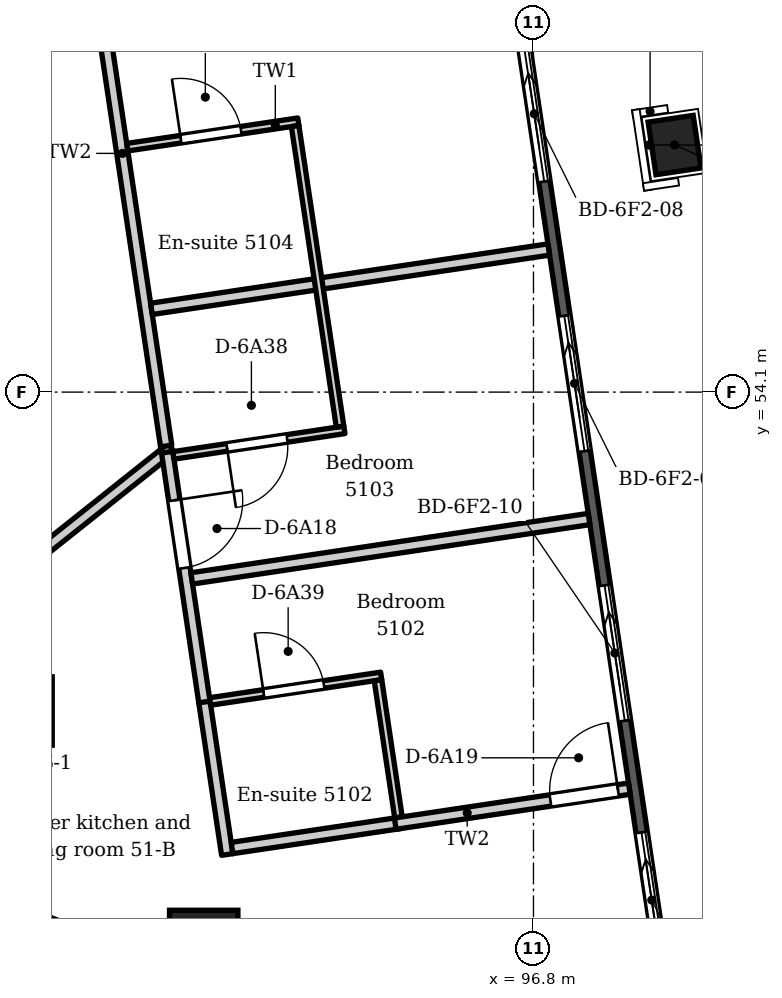
"""IFC4 building model, lengths in metres.
Left out: names, types, materials, properties, quantities, classifications, styles, units other than length and angle.
Written with IfcOpenShell. Run it as: python <this file> out.ifc"""

import sys

from ifc_helpers import new_model, si_unit, direction, frame, frame_2d, origin, origin_2d, place, context, subcontext, project, spatial, polyline, rectangle, circle, outline, extrude, element, fill, save


model = new_model("IFC4")
c1 = context("Model", 3, precision=1e-05, world=origin(), true_north=direction((0.0, 1.0)))
c2 = subcontext(c1, "Body", "Model", "MODEL_VIEW")
j1 = project(units=[si_unit("LENGTHUNIT", "METRE"), si_unit("PLANEANGLEUNIT", "RADIAN")], contexts=[c1])
p1 = place(None, origin())
s1 = spatial("IfcSite", under=j1, at=p1, CompositionType="ELEMENT")
p2 = place(p1, origin())
s2 = spatial("IfcBuilding", under=s1, at=p2, CompositionType="ELEMENT")
p3 = place(p2, frame((0.0, 0.0, 198.0)))
s3 = spatial("IfcBuildingStorey", under=s2, at=p3, CompositionType="ELEMENT", Elevation=198.0)
p4 = place(p3, frame((98.656, 57.35, -0.35), z_axis=(0.0, 0.0, 1.0), x_axis=(-0.14780941113, 0.989015863362, 0.0)))
e1 = element("IfcColumn", 1, at=p4, inside=s3, PredefinedType="COLUMN", context=c2, shape_type="SweptSolid", body=[
    extrude(rectangle(XDim=0.7, YDim=0.6, at=origin_2d()), origin(), (0.0, 0.0, 1.0), 3.95),
])
for number, where, z_axis, x_axis in (
    (2, (90.019, 49.905, -0.35), (0.0, 0.0, 1.0), (1.0, 0.0, 0.0)),
    (3, (92.462, 46.833, -0.35), (0.0, 0.0, 1.0), (1.0, 0.0, 0.0)),
):
    element("IfcColumn", number, at=place(p3, frame(where, z_axis=z_axis, x_axis=x_axis)), inside=s3, PredefinedType="COLUMN", context=c2, shape_type="SweptSolid", body=[
        extrude(circle(Radius=0.45, at=origin_2d()), origin(), (0.0, 0.0, 1.0), 3.95),
    ])
p5 = place(p3, frame((92.835, 84.36, 0.0), z_axis=(0.0, 0.0, 1.0), x_axis=(0.147810490781, -0.989015702006, 0.0)))
e4 = element("IfcWall", 4, at=p5, inside=s3, PredefinedType="SOLIDWALL", context=c2, shape_type="SweptSolid", body=[
    extrude(outline(polyline([(0.149, 0.075), (0.149, -0.075), (39.297, -0.075), (39.297, 0.075), (0.149, 0.075)])), origin(), (0.0, 0.0, 1.0), 3.3),
])
p6 = place(p5, frame((1.193, 0.0, 0.0)))
e5 = element("IfcOpeningElement", 5, at=p6, cuts=e4, PredefinedType="OPENING", context=c2, shape_type="SweptSolid", body=[
    extrude(rectangle(XDim=1.8, YDim=2.6, at=frame_2d((0.9, 1.3))), frame((0.0, 0.085, 0.0), z_axis=(0.0, -1.0, 0.0), x_axis=(1.0, 0.0, 0.0)), (0.0, 0.0, 1.0), 0.17),
])
p7 = place(p5, frame((4.479, 0.0, 0.0)))
e6 = element("IfcOpeningElement", 6, at=p7, cuts=e4, PredefinedType="OPENING", context=c2, shape_type="SweptSolid", body=[
    extrude(rectangle(XDim=1.8, YDim=2.6, at=frame_2d((0.9, 1.3))), frame((0.0, 0.085, 0.0), z_axis=(0.0, -1.0, 0.0), x_axis=(1.0, 0.0, 0.0)), (0.0, 0.0, 1.0), 0.17),
])
p8 = place(p5, frame((8.065, 0.0, 0.0)))
e7 = element("IfcOpeningElement", 7, at=p8, cuts=e4, PredefinedType="OPENING", context=c2, shape_type="SweptSolid", body=[
    extrude(rectangle(XDim=1.8, YDim=2.6, at=frame_2d((0.9, 1.3))), frame((0.0, 0.085, 0.0), z_axis=(0.0, -1.0, 0.0), x_axis=(1.0, 0.0, 0.0)), (0.0, 0.0, 1.0), 0.17),
])
p9 = place(p5, frame((11.651, 0.0, 0.0)))
e8 = element("IfcOpeningElement", 8, at=p9, cuts=e4, PredefinedType="OPENING", context=c2, shape_type="SweptSolid", body=[
    extrude(rectangle(XDim=1.8, YDim=2.6, at=frame_2d((0.9, 1.3))), frame((0.0, 0.085, 0.0), z_axis=(0.0, -1.0, 0.0), x_axis=(1.0, 0.0, 0.0)), (0.0, 0.0, 1.0), 0.17),
])
p10 = place(p5, frame((15.237, 0.0, 0.0)))
e9 = element("IfcOpeningElement", 9, at=p10, cuts=e4, PredefinedType="OPENING", context=c2, shape_type="SweptSolid", body=[
    extrude(rectangle(XDim=1.8, YDim=2.6, at=frame_2d((0.9, 1.3))), frame((0.0, 0.085, 0.0), z_axis=(0.0, -1.0, 0.0), x_axis=(1.0, 0.0, 0.0)), (0.0, 0.0, 1.0), 0.17),
])
p11 = place(p5, frame((18.823, 0.0, 0.0)))
e10 = element("IfcOpeningElement", 10, at=p11, cuts=e4, PredefinedType="OPENING", context=c2, shape_type="SweptSolid", body=[
    extrude(rectangle(XDim=1.8, YDim=2.6, at=frame_2d((0.9, 1.3))), frame((0.0, 0.085, 0.0), z_axis=(0.0, -1.0, 0.0), x_axis=(1.0, 0.0, 0.0)), (0.0, 0.0, 1.0), 0.17),
])
p12 = place(p5, frame((22.409, 0.0, 0.0)))
e11 = element("IfcOpeningElement", 11, at=p12, cuts=e4, PredefinedType="OPENING", context=c2, shape_type="SweptSolid", body=[
    extrude(rectangle(XDim=1.8, YDim=2.6, at=frame_2d((0.9, 1.3))), frame((0.0, 0.085, 0.0), z_axis=(0.0, -1.0, 0.0), x_axis=(1.0, 0.0, 0.0)), (0.0, 0.0, 1.0), 0.17),
])
p13 = place(p5, frame((25.995, 0.0, 0.0)))
e12 = element("IfcOpeningElement", 12, at=p13, cuts=e4, PredefinedType="OPENING", context=c2, shape_type="SweptSolid", body=[
    extrude(rectangle(XDim=1.8, YDim=2.6, at=frame_2d((0.9, 1.3))), frame((0.0, 0.085, 0.0), z_axis=(0.0, -1.0, 0.0), x_axis=(1.0, 0.0, 0.0)), (0.0, 0.0, 1.0), 0.17),
])
p14 = place(p5, frame((29.581, 0.0, 0.0)))
e13 = element("IfcOpeningElement", 13, at=p14, cuts=e4, PredefinedType="OPENING", context=c2, shape_type="SweptSolid", body=[
    extrude(rectangle(XDim=1.8, YDim=2.6, at=frame_2d((0.9, 1.3))), frame((0.0, 0.085, 0.0), z_axis=(0.0, -1.0, 0.0), x_axis=(1.0, 0.0, 0.0)), (0.0, 0.0, 1.0), 0.17),
])
p15 = place(p5, frame((33.167, 0.0, 0.0)))
e14 = element("IfcOpeningElement", 14, at=p15, cuts=e4, PredefinedType="OPENING", context=c2, shape_type="SweptSolid", body=[
    extrude(rectangle(XDim=1.8, YDim=2.6, at=frame_2d((0.9, 1.3))), frame((0.0, 0.085, 0.0), z_axis=(0.0, -1.0, 0.0), x_axis=(1.0, 0.0, 0.0)), (0.0, 0.0, 1.0), 0.17),
])
p16 = place(p5, frame((36.453, 0.0, 0.0)))
e15 = element("IfcOpeningElement", 15, at=p16, cuts=e4, PredefinedType="OPENING", context=c2, shape_type="SweptSolid", body=[
    extrude(rectangle(XDim=1.8, YDim=2.6, at=frame_2d((0.9, 1.3))), frame((0.0, 0.085, 0.0), z_axis=(0.0, -1.0, 0.0), x_axis=(1.0, 0.0, 0.0)), (0.0, 0.0, 1.0), 0.17),
])
p17 = place(p3, frame((92.514, 40.454, 0.0), z_axis=(0.0, 0.0, 1.0), x_axis=(-0.930417922313, 0.3665003272, 0.0)))
e16 = element("IfcWall", 16, at=p17, inside=s3, PredefinedType="SOLIDWALL", context=c2, shape_type="SweptSolid", body=[
    extrude(outline(polyline([(0.149, 0.075), (0.149, -0.075), (39.297, -0.075), (39.297, 0.075), (0.149, 0.075)])), origin(), (0.0, 0.0, 1.0), 3.3),
])
p18 = place(p17, frame((1.193, 0.0, 0.0)))
e17 = element("IfcOpeningElement", 17, at=p18, cuts=e16, PredefinedType="OPENING", context=c2, shape_type="SweptSolid", body=[
    extrude(rectangle(XDim=1.8, YDim=2.6, at=frame_2d((0.9, 1.3))), frame((0.0, 0.085, 0.0), z_axis=(0.0, -1.0, 0.0), x_axis=(1.0, 0.0, 0.0)), (0.0, 0.0, 1.0), 0.17),
])
p19 = place(p17, frame((4.479, 0.0, 0.0)))
e18 = element("IfcOpeningElement", 18, at=p19, cuts=e16, PredefinedType="OPENING", context=c2, shape_type="SweptSolid", body=[
    extrude(rectangle(XDim=1.8, YDim=2.6, at=frame_2d((0.9, 1.3))), frame((0.0, 0.085, 0.0), z_axis=(0.0, -1.0, 0.0), x_axis=(1.0, 0.0, 0.0)), (0.0, 0.0, 1.0), 0.17),
])
p20 = place(p17, frame((8.065, 0.0, 0.0)))
e19 = element("IfcOpeningElement", 19, at=p20, cuts=e16, PredefinedType="OPENING", context=c2, shape_type="SweptSolid", body=[
    extrude(rectangle(XDim=1.8, YDim=2.6, at=frame_2d((0.9, 1.3))), frame((0.0, 0.085, 0.0), z_axis=(0.0, -1.0, 0.0), x_axis=(1.0, 0.0, 0.0)), (0.0, 0.0, 1.0), 0.17),
])
p21 = place(p17, frame((11.651, 0.0, 0.0)))
e20 = element("IfcOpeningElement", 20, at=p21, cuts=e16, PredefinedType="OPENING", context=c2, shape_type="SweptSolid", body=[
    extrude(rectangle(XDim=1.8, YDim=2.6, at=frame_2d((0.9, 1.3))), frame((0.0, 0.085, 0.0), z_axis=(0.0, -1.0, 0.0), x_axis=(1.0, 0.0, 0.0)), (0.0, 0.0, 1.0), 0.17),
])
p22 = place(p17, frame((15.237, 0.0, 0.0)))
e21 = element("IfcOpeningElement", 21, at=p22, cuts=e16, PredefinedType="OPENING", context=c2, shape_type="SweptSolid", body=[
    extrude(rectangle(XDim=1.8, YDim=2.6, at=frame_2d((0.9, 1.3))), frame((0.0, 0.085, 0.0), z_axis=(0.0, -1.0, 0.0), x_axis=(1.0, 0.0, 0.0)), (0.0, 0.0, 1.0), 0.17),
])
p23 = place(p17, frame((18.823, 0.0, 0.0)))
e22 = element("IfcOpeningElement", 22, at=p23, cuts=e16, PredefinedType="OPENING", context=c2, shape_type="SweptSolid", body=[
    extrude(rectangle(XDim=1.8, YDim=2.6, at=frame_2d((0.9, 1.3))), frame((0.0, 0.085, 0.0), z_axis=(0.0, -1.0, 0.0), x_axis=(1.0, 0.0, 0.0)), (0.0, 0.0, 1.0), 0.17),
])
p24 = place(p17, frame((22.409, 0.0, 0.0)))
e23 = element("IfcOpeningElement", 23, at=p24, cuts=e16, PredefinedType="OPENING", context=c2, shape_type="SweptSolid", body=[
    extrude(rectangle(XDim=1.8, YDim=2.6, at=frame_2d((0.9, 1.3))), frame((0.0, 0.085, 0.0), z_axis=(0.0, -1.0, 0.0), x_axis=(1.0, 0.0, 0.0)), (0.0, 0.0, 1.0), 0.17),
])
p25 = place(p17, frame((25.995, 0.0, 0.0)))
e24 = element("IfcOpeningElement", 24, at=p25, cuts=e16, PredefinedType="OPENING", context=c2, shape_type="SweptSolid", body=[
    extrude(rectangle(XDim=1.8, YDim=2.6, at=frame_2d((0.9, 1.3))), frame((0.0, 0.085, 0.0), z_axis=(0.0, -1.0, 0.0), x_axis=(1.0, 0.0, 0.0)), (0.0, 0.0, 1.0), 0.17),
])
p26 = place(p17, frame((29.581, 0.0, 0.0)))
e25 = element("IfcOpeningElement", 25, at=p26, cuts=e16, PredefinedType="OPENING", context=c2, shape_type="SweptSolid", body=[
    extrude(rectangle(XDim=1.8, YDim=2.6, at=frame_2d((0.9, 1.3))), frame((0.0, 0.085, 0.0), z_axis=(0.0, -1.0, 0.0), x_axis=(1.0, 0.0, 0.0)), (0.0, 0.0, 1.0), 0.17),
])
p27 = place(p17, frame((33.167, 0.0, 0.0)))
e26 = element("IfcOpeningElement", 26, at=p27, cuts=e16, PredefinedType="OPENING", context=c2, shape_type="SweptSolid", body=[
    extrude(rectangle(XDim=1.8, YDim=2.6, at=frame_2d((0.9, 1.3))), frame((0.0, 0.085, 0.0), z_axis=(0.0, -1.0, 0.0), x_axis=(1.0, 0.0, 0.0)), (0.0, 0.0, 1.0), 0.17),
])
p28 = place(p17, frame((36.453, 0.0, 0.0)))
e27 = element("IfcOpeningElement", 27, at=p28, cuts=e16, PredefinedType="OPENING", context=c2, shape_type="SweptSolid", body=[
    extrude(rectangle(XDim=1.8, YDim=2.6, at=frame_2d((0.9, 1.3))), frame((0.0, 0.085, 0.0), z_axis=(0.0, -1.0, 0.0), x_axis=(1.0, 0.0, 0.0)), (0.0, 0.0, 1.0), 0.17),
])
p29 = place(p3, origin())
e28 = element("IfcWall", 28, at=p29, inside=s3, PredefinedType="PARAPET", context=c2, shape_type="SweptSolid", body=[
    extrude(outline(polyline([(64.54, 48.931), (93.272, 32.007), (93.275, 32.354), (66.324, 48.229), (64.54, 48.931)])), origin(), (0.0, 0.0, 1.0), 1.1),
])
p30 = place(p3, frame((87.833, 48.14, 0.0), z_axis=(0.0, 0.0, 1.0), x_axis=(0.930350489768, -0.366671469014, 0.0)))
e29 = element("IfcWall", 29, at=p30, inside=s3, PredefinedType="PARTITIONING", context=c2, shape_type="SweptSolid", body=[
    extrude(rectangle(XDim=3.661, YDim=0.15, at=frame_2d((1.83, 0.0))), origin(), (0.0, 0.0, 1.0), 3.3),
])
p31 = place(p3, frame((90.285, 51.969, 0.0), z_axis=(0.0, 0.0, 1.0), x_axis=(0.782471905859, 0.622685889145, 0.0)))
e30 = element("IfcWall", 30, at=p31, inside=s3, PredefinedType="PARTITIONING", context=c2, shape_type="SweptSolid", body=[
    extrude(rectangle(XDim=2.24, YDim=0.15, at=frame_2d((1.12, 0.0))), origin(), (0.0, 0.0, 1.0), 3.3),
])
p32 = place(p3, frame((90.628, 62.355, 0.0), z_axis=(0.0, 0.0, 1.0), x_axis=(0.147851766837, -0.989009532332, 0.0)))
e31 = element("IfcWall", 31, at=p32, inside=s3, PredefinedType="PARTITIONING", context=c2, shape_type="SweptSolid", body=[
    extrude(rectangle(XDim=9.064, YDim=0.15, at=frame_2d((4.532, 0.0))), origin(), (0.0, 0.0, 1.0), 3.3),
])
p33 = place(p32, frame((0.229, 0.0, 0.0)))
e32 = element("IfcOpeningElement", 32, at=p33, cuts=e31, PredefinedType="OPENING", context=c2, shape_type="SweptSolid", body=[
    extrude(rectangle(XDim=0.9, YDim=2.1, at=frame_2d((0.45, 1.05))), frame((0.0, 0.085, 0.0), z_axis=(0.0, -1.0, 0.0), x_axis=(1.0, 0.0, 0.0)), (0.0, 0.0, 1.0), 0.17),
])
p34 = place(p3, frame((91.456, 57.322, 0.0), z_axis=(0.0, 0.0, 1.0), x_axis=(0.989070541656, 0.147443086062, 0.0)))
e33 = element("IfcWall", 33, at=p34, inside=s3, PredefinedType="PARTITIONING", context=c2, shape_type="SweptSolid", body=[
    extrude(rectangle(XDim=2.275, YDim=0.1, at=frame_2d((1.138, 0.0))), origin(), (0.0, 0.0, 1.0), 3.3),
])
p35 = place(p34, frame((0.713, 0.0, 0.0)))
e34 = element("IfcOpeningElement", 34, at=p35, cuts=e33, PredefinedType="OPENING", context=c2, shape_type="SweptSolid", body=[
    extrude(rectangle(XDim=0.8, YDim=2.1, at=frame_2d((0.4, 1.05))), frame((0.0, 0.06, 0.0), z_axis=(0.0, -1.0, 0.0), x_axis=(1.0, 0.0, 0.0)), (0.0, 0.0, 1.0), 0.12),
])
p36 = place(p3, frame((91.774, 55.195, 0.0), z_axis=(0.0, 0.0, 1.0), x_axis=(0.98902190879, 0.147768954566, 0.0)))
e35 = element("IfcWall", 35, at=p36, inside=s3, PredefinedType="PARTITIONING", context=c2, shape_type="SweptSolid", body=[
    extrude(rectangle(XDim=5.285, YDim=0.15, at=frame_2d((2.643, 0.0))), origin(), (0.0, 0.0, 1.0), 3.3),
])
p37 = place(p3, frame((91.981, 53.31, 0.0), z_axis=(0.0, 0.0, 1.0), x_axis=(0.147462331027, -0.989067672572, 0.0)))
e36 = element("IfcWall", 36, at=p37, inside=s3, PredefinedType="PARTITIONING", context=c2, shape_type="SweptSolid", body=[
    extrude(rectangle(XDim=3.331, YDim=0.15, at=frame_2d((1.666, 0.0))), origin(), (0.0, 0.0, 1.0), 3.3),
])
p38 = place(p37, frame((0.64, 0.0, 0.0)))
e37 = element("IfcOpeningElement", 37, at=p38, cuts=e36, PredefinedType="OPENING", context=c2, shape_type="SweptSolid", body=[
    extrude(rectangle(XDim=0.9, YDim=2.1, at=frame_2d((0.45, 1.05))), frame((0.0, 0.085, 0.0), z_axis=(0.0, -1.0, 0.0), x_axis=(1.0, 0.0, 0.0)), (0.0, 0.0, 1.0), 0.17),
])
p39 = place(p3, frame((92.063, 53.267, 0.0), z_axis=(0.0, 0.0, 1.0), x_axis=(0.988998470103, 0.147925745338, 0.0)))
e38 = element("IfcWall", 38, at=p39, inside=s3, PredefinedType="PARTITIONING", context=c2, shape_type="SweptSolid", body=[
    extrude(rectangle(XDim=2.274, YDim=0.1, at=frame_2d((1.137, 0.0))), origin(), (0.0, 0.0, 1.0), 3.3),
])
p40 = place(p39, frame((0.712, 0.0, 0.0)))
e39 = element("IfcOpeningElement", 39, at=p40, cuts=e38, PredefinedType="OPENING", context=c2, shape_type="SweptSolid", body=[
    extrude(rectangle(XDim=0.8, YDim=2.1, at=frame_2d((0.4, 1.05))), frame((0.0, 0.06, 0.0), z_axis=(0.0, -1.0, 0.0), x_axis=(1.0, 0.0, 0.0)), (0.0, 0.0, 1.0), 0.12),
])
p41 = place(p3, frame((92.304, 51.649, 0.0), z_axis=(0.0, 0.0, 1.0), x_axis=(0.98902190879, 0.147768954566, 0.0)))
e40 = element("IfcWall", 40, at=p41, inside=s3, PredefinedType="PARTITIONING", context=c2, shape_type="SweptSolid", body=[
    extrude(rectangle(XDim=5.285, YDim=0.15, at=frame_2d((2.643, 0.0))), origin(), (0.0, 0.0, 1.0), 3.3),
])
p42 = place(p3, frame((92.471, 50.023, 0.0), z_axis=(0.0, 0.0, 1.0), x_axis=(0.147922563544, -0.988998946003, 0.0)))
e41 = element("IfcWall", 41, at=p42, inside=s3, PredefinedType="PARTITIONING", context=c2, shape_type="SweptSolid", body=[
    extrude(rectangle(XDim=2.028, YDim=0.15, at=frame_2d((1.014, 0.0))), origin(), (0.0, 0.0, 1.0), 3.3),
])
p43 = place(p3, frame((92.546, 50.03, 0.0), z_axis=(0.0, 0.0, 1.0), x_axis=(0.989007860101, 0.147862952286, 0.0)))
e42 = element("IfcWall", 42, at=p43, inside=s3, PredefinedType="PARTITIONING", context=c2, shape_type="SweptSolid", body=[
    extrude(rectangle(XDim=2.275, YDim=0.1, at=frame_2d((1.138, 0.0))), origin(), (0.0, 0.0, 1.0), 3.3),
])
p44 = place(p43, frame((0.713, 0.0, 0.0)))
e43 = element("IfcOpeningElement", 43, at=p44, cuts=e42, PredefinedType="OPENING", context=c2, shape_type="SweptSolid", body=[
    extrude(rectangle(XDim=0.8, YDim=2.1, at=frame_2d((0.4, 1.05))), frame((0.0, 0.06, 0.0), z_axis=(0.0, -1.0, 0.0), x_axis=(1.0, 0.0, 0.0)), (0.0, 0.0, 1.0), 0.12),
])
p45 = place(p3, frame((92.834, 48.102, 0.0), z_axis=(0.0, 0.0, 1.0), x_axis=(0.989058920162, 0.147521023747, 0.0)))
e44 = element("IfcWall", 44, at=p45, inside=s3, PredefinedType="PARTITIONING", context=c2, shape_type="SweptSolid", body=[
    extrude(rectangle(XDim=2.229, YDim=0.15, at=frame_2d((1.115, 0.0))), origin(), (0.0, 0.0, 1.0), 3.3),
])
p46 = place(p3, frame((93.664, 57.601, 0.0), z_axis=(0.0, 0.0, 1.0), x_axis=(0.147862783837, -0.989007885285, 0.0)))
e45 = element("IfcWall", 45, at=p46, inside=s3, PredefinedType="PARTITIONING", context=c2, shape_type="SweptSolid", body=[
    extrude(rectangle(XDim=3.999, YDim=0.1, at=frame_2d((2.0, 0.0))), origin(), (0.0, 0.0, 1.0), 3.3),
])
p47 = place(p3, frame((94.754, 50.31, 0.0), z_axis=(0.0, 0.0, 1.0), x_axis=(0.14773187693, -0.989027447819, 0.0)))
e46 = element("IfcWall", 46, at=p47, inside=s3, PredefinedType="PARTITIONING", context=c2, shape_type="SweptSolid", body=[
    extrude(rectangle(XDim=1.824, YDim=0.1, at=frame_2d((0.912, 0.0))), origin(), (0.0, 0.0, 1.0), 3.3),
])
p48 = place(p3, frame((94.981, 48.423, 0.0), z_axis=(0.0, 0.0, 1.0), x_axis=(0.989008118829, 0.147861221729, 0.0)))
e47 = element("IfcWall", 47, at=p48, inside=s3, PredefinedType="PARTITIONING", context=c2, shape_type="SweptSolid", body=[
    extrude(rectangle(XDim=3.114, YDim=0.15, at=frame_2d((1.557, 0.0))), origin(), (0.0, 0.0, 1.0), 3.3),
])
p49 = place(p48, frame((2.064, 0.0, 0.0)))
e48 = element("IfcOpeningElement", 48, at=p49, cuts=e47, PredefinedType="OPENING", context=c2, shape_type="SweptSolid", body=[
    extrude(rectangle(XDim=0.9, YDim=2.1, at=frame_2d((0.45, 1.05))), frame((0.0, 0.085, 0.0), z_axis=(0.0, -1.0, 0.0), x_axis=(1.0, 0.0, 0.0)), (0.0, 0.0, 1.0), 0.17),
])
p50 = place(p13, origin())
e49 = element("IfcDoor", 49, at=p50, inside=s3, OperationType="SLIDING_TO_LEFT", PredefinedType="DOOR", context=c2, shape_type="SweptSolid", body=[
    extrude(rectangle(XDim=1.8, YDim=2.6, at=frame_2d((0.9, 1.3))), frame((0.0, 0.025, 0.0), z_axis=(0.0, -1.0, 0.0), x_axis=(1.0, 0.0, 0.0)), (0.0, 0.0, 1.0), 0.05),
])
fill(e12, e49)
p51 = place(p14, origin())
e50 = element("IfcDoor", 50, at=p51, inside=s3, OperationType="SLIDING_TO_LEFT", PredefinedType="DOOR", context=c2, shape_type="SweptSolid", body=[
    extrude(rectangle(XDim=1.8, YDim=2.6, at=frame_2d((0.9, 1.3))), frame((0.0, 0.025, 0.0), z_axis=(0.0, -1.0, 0.0), x_axis=(1.0, 0.0, 0.0)), (0.0, 0.0, 1.0), 0.05),
])
fill(e13, e50)
p52 = place(p15, origin())
e51 = element("IfcDoor", 51, at=p52, inside=s3, OperationType="SLIDING_TO_LEFT", PredefinedType="DOOR", context=c2, shape_type="SweptSolid", body=[
    extrude(rectangle(XDim=1.8, YDim=2.6, at=frame_2d((0.9, 1.3))), frame((0.0, 0.025, 0.0), z_axis=(0.0, -1.0, 0.0), x_axis=(1.0, 0.0, 0.0)), (0.0, 0.0, 1.0), 0.05),
])
fill(e14, e51)
p53 = place(p16, origin())
e52 = element("IfcDoor", 52, at=p53, inside=s3, OperationType="SLIDING_TO_LEFT", PredefinedType="DOOR", context=c2, shape_type="SweptSolid", body=[
    extrude(rectangle(XDim=1.8, YDim=2.6, at=frame_2d((0.9, 1.3))), frame((0.0, 0.025, 0.0), z_axis=(0.0, -1.0, 0.0), x_axis=(1.0, 0.0, 0.0)), (0.0, 0.0, 1.0), 0.05),
])
fill(e15, e52)
p54 = place(p38, origin())
e53 = element("IfcDoor", 53, at=p54, inside=s3, OperationType="SINGLE_SWING_LEFT", PredefinedType="DOOR", context=c2, shape_type="SweptSolid", body=[
    extrude(rectangle(XDim=0.9, YDim=2.1, at=frame_2d((0.45, 1.05))), frame((0.0, 0.025, 0.0), z_axis=(0.0, -1.0, 0.0), x_axis=(1.0, 0.0, 0.0)), (0.0, 0.0, 1.0), 0.05),
])
fill(e37, e53)
p55 = place(p49, origin())
e54 = element("IfcDoor", 54, at=p55, inside=s3, OperationType="SINGLE_SWING_RIGHT", PredefinedType="DOOR", context=c2, shape_type="SweptSolid", body=[
    extrude(rectangle(XDim=0.9, YDim=2.1, at=frame_2d((0.45, 1.05))), frame((0.0, 0.025, 0.0), z_axis=(0.0, -1.0, 0.0), x_axis=(1.0, 0.0, 0.0)), (0.0, 0.0, 1.0), 0.05),
])
fill(e48, e54)
p56 = place(p35, origin())
e55 = element("IfcDoor", 55, at=p56, inside=s3, OperationType="SINGLE_SWING_LEFT", PredefinedType="DOOR", context=c2, shape_type="SweptSolid", body=[
    extrude(rectangle(XDim=0.8, YDim=2.1, at=frame_2d((0.4, 1.05))), frame((0.0, 0.025, 0.0), z_axis=(0.0, -1.0, 0.0), x_axis=(1.0, 0.0, 0.0)), (0.0, 0.0, 1.0), 0.05),
])
fill(e34, e55)
p57 = place(p40, frame((0.8, 0.0, 0.0), z_axis=(0.0, 0.0, 1.0), x_axis=(-1.0, 0.0, 0.0)))
e56 = element("IfcDoor", 56, at=p57, inside=s3, OperationType="SINGLE_SWING_RIGHT", PredefinedType="DOOR", context=c2, shape_type="SweptSolid", body=[
    extrude(rectangle(XDim=0.8, YDim=2.1, at=frame_2d((0.4, 1.05))), frame((0.0, 0.025, 0.0), z_axis=(0.0, -1.0, 0.0), x_axis=(1.0, 0.0, 0.0)), (0.0, 0.0, 1.0), 0.05),
])
fill(e39, e56)
p58 = place(p44, origin())
e57 = element("IfcDoor", 57, at=p58, inside=s3, OperationType="SINGLE_SWING_LEFT", PredefinedType="DOOR", context=c2, shape_type="SweptSolid", body=[
    extrude(rectangle(XDim=0.8, YDim=2.1, at=frame_2d((0.4, 1.05))), frame((0.0, 0.025, 0.0), z_axis=(0.0, -1.0, 0.0), x_axis=(1.0, 0.0, 0.0)), (0.0, 0.0, 1.0), 0.05),
])
fill(e43, e57)
save(model, sys.argv[1])
